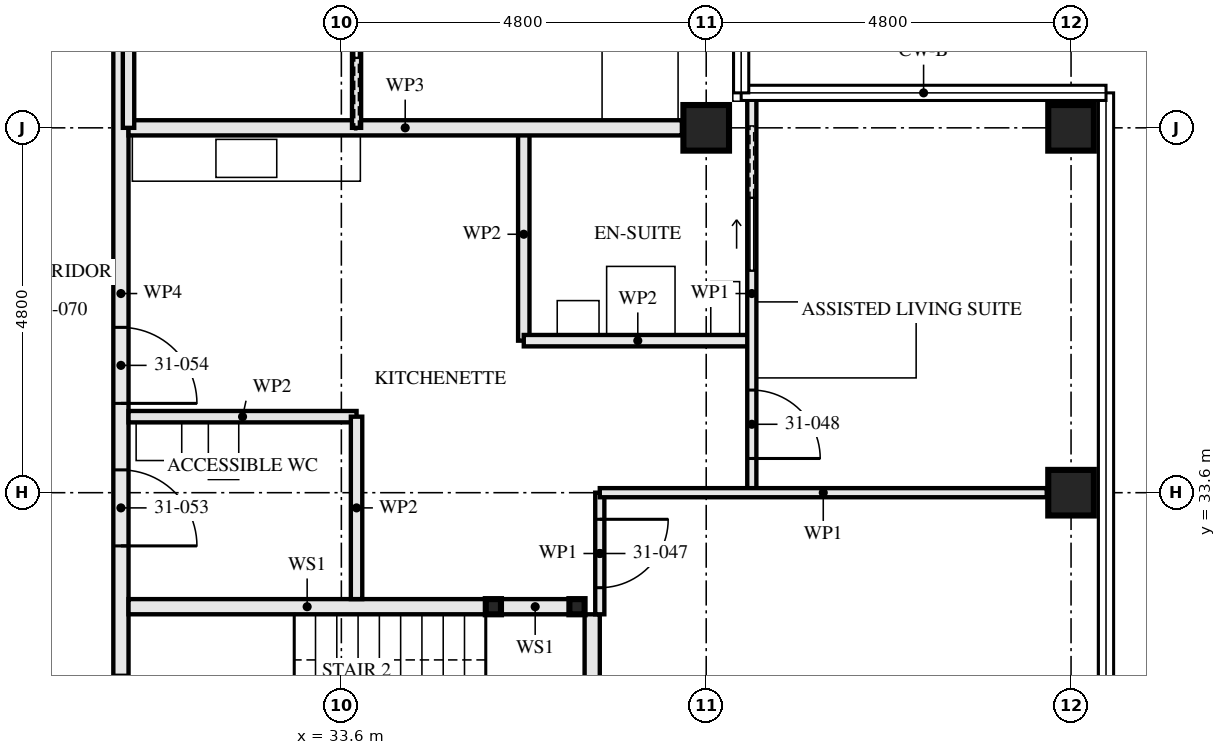
"""IFC4 building model, lengths in metres.
Left out: names, types, materials, properties, quantities, classifications, styles, units other than length and angle.
Written with IfcOpenShell. Run it as: python <this file> out.ifc"""

import sys

from ifc_helpers import new_model, si_unit, direction, frame, frame_2d, origin, origin_2d, place, context, subcontext, project, spatial, rectangle, hollow_rectangle, extrude, element, fill, save


model = new_model("IFC4")
c1 = context("Model", 3, precision=1e-05, world=origin(), true_north=direction((0.0, 1.0)))
c2 = subcontext(c1, "Body", "Model", "MODEL_VIEW")
j1 = project(units=[si_unit("LENGTHUNIT", "METRE"), si_unit("PLANEANGLEUNIT", "RADIAN")], contexts=[c1])
p1 = place(None, origin())
s1 = spatial("IfcSite", under=j1, at=p1, CompositionType="ELEMENT")
p2 = place(p1, origin())
s2 = spatial("IfcBuilding", under=s1, at=p2, CompositionType="ELEMENT")
p3 = place(p2, frame((0.0, 0.0, 115.5)))
s3 = spatial("IfcBuildingStorey", under=s2, at=p3, CompositionType="ELEMENT", Elevation=115.5)
for number, where, z_axis, x_axis in (
    (1, (38.4, 38.4, 0.0), (0.0, 0.0, 1.0), (0.0, 1.0, 0.0)),
    (2, (43.2, 33.6, 0.0), (0.0, 0.0, 1.0), (1.0, 0.0, 0.0)),
    (3, (43.2, 38.4, 0.0), (0.0, 0.0, 1.0), (0.0, 1.0, 0.0)),
):
    element("IfcColumn", number, at=place(p3, frame(where, z_axis=z_axis, x_axis=x_axis)), inside=s3, PredefinedType="COLUMN", context=c2, shape_type="SweptSolid", body=[
        extrude(hollow_rectangle(XDim=0.6, YDim=0.6, WallThickness=0.08, at=origin_2d()), origin(), (0.0, 0.0, 1.0), 3.5),
    ])
for number, where, z_axis, x_axis in (
    (4, (36.7, 32.1, 0.0), (0.0, 0.0, 1.0), (1.0, 0.0, 0.0)),
    (5, (35.6, 32.1, 0.0), (0.0, 0.0, 1.0), (1.0, 0.0, 0.0)),
):
    element("IfcColumn", number, at=place(p3, frame(where, z_axis=z_axis, x_axis=x_axis)), inside=s3, PredefinedType="COLUMN", context=c2, shape_type="SweptSolid", body=[
        extrude(hollow_rectangle(XDim=0.2, YDim=0.2, WallThickness=0.008, at=origin_2d()), origin(), (0.0, 0.0, 1.0), 3.33),
    ])
p4 = place(p3, frame((36.6, 32.1, 0.0), z_axis=(0.0, 0.0, 1.0), x_axis=(-1.0, 0.0, 0.0)))
e6 = element("IfcWall", 6, at=p4, inside=s3, PredefinedType="SOLIDWALL", context=c2, shape_type="SweptSolid", body=[
    extrude(rectangle(XDim=0.9, YDim=0.2, at=frame_2d((0.45, 0.0))), origin(), (0.0, 0.0, 1.0), 2.99),
])
p5 = place(p3, frame((35.5, 32.1, 0.0), z_axis=(0.0, 0.0, 1.0), x_axis=(-1.0, 0.0, 0.0)))
e7 = element("IfcWall", 7, at=p5, inside=s3, PredefinedType="SOLIDWALL", context=c2, shape_type="SweptSolid", body=[
    extrude(rectangle(XDim=4.7, YDim=0.2, at=frame_2d((2.35, 0.0))), origin(), (0.0, 0.0, 1.0), 2.99),
])
p6 = place(p3, frame((36.9, 29.4, 0.0), z_axis=(0.0, 0.0, 1.0), x_axis=(0.0, 1.0, 0.0)))
e8 = element("IfcWall", 8, at=p6, inside=s3, PredefinedType="SOLIDWALL", context=c2, shape_type="SweptSolid", body=[
    extrude(rectangle(XDim=2.6, YDim=0.2, at=frame_2d((1.3, 0.0))), origin(), (0.0, 0.0, 1.0), 3.33),
])
p7 = place(p3, frame((33.8, 32.2, 0.0), z_axis=(0.0, 0.0, 1.0), x_axis=(0.0, 1.0, 0.0)))
e9 = element("IfcWall", 9, at=p7, inside=s3, PredefinedType="PARTITIONING", context=c2, shape_type="SweptSolid", body=[
    extrude(rectangle(XDim=2.4, YDim=0.15, at=frame_2d((1.2, 0.0))), origin(), (0.0, 0.0, 1.0), 2.55),
])
for number, where, z_axis, x_axis in (
    (10, (33.8, 34.6, 0.0), (0.0, 0.0, 1.0), (-1.0, 0.0, 0.0)),
    (11, (39.0, 35.6, 0.0), (0.0, 0.0, 1.0), (-1.0, 0.0, 0.0)),
):
    element("IfcWall", number, at=place(p3, frame(where, z_axis=z_axis, x_axis=x_axis)), inside=s3, PredefinedType="PARTITIONING", context=c2, shape_type="SweptSolid", body=[
        extrude(rectangle(XDim=3.0, YDim=0.15, at=frame_2d((1.5, 0.0))), origin(), (0.0, 0.0, 1.0), 3.33),
    ])
p8 = place(p3, frame((36.0, 35.6, 0.0), z_axis=(0.0, 0.0, 1.0), x_axis=(0.0, 1.0, 0.0)))
e12 = element("IfcWall", 12, at=p8, inside=s3, PredefinedType="PARTITIONING", context=c2, shape_type="SweptSolid", body=[
    extrude(rectangle(XDim=2.8, YDim=0.15, at=frame_2d((1.4, 0.0))), origin(), (0.0, 0.0, 1.0), 3.33),
])
p9 = place(p3, frame((37.0, 32.0, 0.0), z_axis=(0.0, 0.0, 1.0), x_axis=(0.0, 1.0, 0.0)))
e13 = element("IfcWall", 13, at=p9, inside=s3, PredefinedType="PARTITIONING", context=c2, shape_type="SweptSolid", body=[
    extrude(rectangle(XDim=1.6, YDim=0.12, at=frame_2d((0.8, 0.0))), origin(), (0.0, 0.0, 1.0), 3.33),
])
p10 = place(p9, frame((0.35, 0.0, 0.0)))
e14 = element("IfcOpeningElement", 14, at=p10, cuts=e13, PredefinedType="OPENING", context=c2, shape_type="SweptSolid", body=[
    extrude(rectangle(XDim=0.9, YDim=2.1, at=frame_2d((0.45, 1.05))), frame((0.0, 0.071, 0.0), z_axis=(0.0, -1.0, 0.0), x_axis=(1.0, 0.0, 0.0)), (0.0, 0.0, 1.0), 0.141),
])
p11 = place(p3, frame((39.0, 33.6, 0.0), z_axis=(0.0, 0.0, 1.0), x_axis=(0.0, 1.0, 0.0)))
e15 = element("IfcWall", 15, at=p11, inside=s3, PredefinedType="PARTITIONING", context=c2, shape_type="SweptSolid", body=[
    extrude(rectangle(XDim=5.24, YDim=0.12, at=frame_2d((2.62, 0.0))), origin(), (0.0, 0.0, 1.0), 2.32),
])
p12 = place(p11, frame((0.45, 0.0, 0.0)))
e16 = element("IfcOpeningElement", 16, at=p12, cuts=e15, PredefinedType="OPENING", context=c2, shape_type="SweptSolid", body=[
    extrude(rectangle(XDim=0.9, YDim=2.1, at=frame_2d((0.45, 1.05))), frame((0.0, 0.071, 0.0), z_axis=(0.0, -1.0, 0.0), x_axis=(1.0, 0.0, 0.0)), (0.0, 0.0, 1.0), 0.141),
])
p13 = place(p11, frame((2.925, 0.0, 0.0)))
e17 = element("IfcOpeningElement", 17, at=p13, cuts=e15, PredefinedType="OPENING", context=c2, shape_type="SweptSolid", body=[
    extrude(rectangle(XDim=0.95, YDim=2.1, at=frame_2d((0.475, 1.05))), frame((0.0, 0.071, 0.0), z_axis=(0.0, -1.0, 0.0), x_axis=(1.0, 0.0, 0.0)), (0.0, 0.0, 1.0), 0.141),
])
p14 = place(p3, frame((42.88, 33.6, 0.0), z_axis=(0.0, 0.0, 1.0), x_axis=(-1.0, 0.0, 0.0)))
e18 = element("IfcWall", 18, at=p14, inside=s3, PredefinedType="PARTITIONING", context=c2, shape_type="SweptSolid", body=[
    extrude(rectangle(XDim=5.88, YDim=0.12, at=frame_2d((2.94, 0.0))), origin(), (0.0, 0.0, 1.0), 2.55),
])
p15 = place(p3, frame((38.08, 38.4, 0.0), z_axis=(0.0, 0.0, 1.0), x_axis=(-1.0, 0.0, 0.0)))
e19 = element("IfcWall", 19, at=p15, inside=s3, PredefinedType="PARTITIONING", context=c2, shape_type="SweptSolid", body=[
    extrude(rectangle(XDim=7.28, YDim=0.2, at=frame_2d((3.64, 0.0))), origin(), (0.0, 0.0, 1.0), 2.55),
])
p16 = place(p3, frame((30.8, 38.4, 0.0), z_axis=(0.0, 0.0, 1.0), x_axis=(0.0, 1.0, 0.0)))
e20 = element("IfcWall", 20, at=p16, inside=s3, PredefinedType="PARTITIONING", context=c2, shape_type="SweptSolid", body=[
    extrude(rectangle(XDim=2.8, YDim=0.15, at=frame_2d((1.4, 0.0))), origin(), (0.0, 0.0, 1.0), 3.33),
])
p17 = place(p3, frame((33.8, 38.4, 0.0), z_axis=(0.0, 0.0, 1.0), x_axis=(0.0, 1.0, 0.0)))
e21 = element("IfcWall", 21, at=p17, inside=s3, PredefinedType="PARTITIONING", context=c2, shape_type="SweptSolid", body=[
    extrude(rectangle(XDim=4.48, YDim=0.12, at=frame_2d((2.24, 0.0))), origin(), (0.0, 0.0, 1.0), 3.33),
])
p18 = place(p17, frame((2.975, 0.0, 0.0)))
e22 = element("IfcOpeningElement", 22, at=p18, cuts=e21, PredefinedType="OPENING", context=c2, shape_type="SweptSolid", body=[
    extrude(rectangle(XDim=0.9, YDim=2.1, at=frame_2d((0.45, 1.05))), frame((0.0, 0.071, 0.0), z_axis=(0.0, -1.0, 0.0), x_axis=(1.0, 0.0, 0.0)), (0.0, 0.0, 1.0), 0.141),
])
p19 = place(p17, frame((0.925, 0.0, 0.0)))
e23 = element("IfcOpeningElement", 23, at=p19, cuts=e21, PredefinedType="OPENING", context=c2, shape_type="SweptSolid", body=[
    extrude(rectangle(XDim=0.95, YDim=2.1, at=frame_2d((0.475, 1.05))), frame((0.0, 0.071, 0.0), z_axis=(0.0, -1.0, 0.0), x_axis=(1.0, 0.0, 0.0)), (0.0, 0.0, 1.0), 0.141),
])
p20 = place(p3, frame((30.7, 28.8, 0.0), z_axis=(0.0, 0.0, 1.0), x_axis=(0.0, 1.0, 0.0)))
e24 = element("IfcWall", 24, at=p20, inside=s3, PredefinedType="PARTITIONING", context=c2, shape_type="SweptSolid", body=[
    extrude(rectangle(XDim=14.84, YDim=0.2, at=frame_2d((7.42, 0.0))), origin(), (0.0, 0.0, 1.0), 2.32),
])
p21 = place(p20, frame((1.4, 0.0, 0.0)))
e25 = element("IfcOpeningElement", 25, at=p21, cuts=e24, PredefinedType="OPENING", context=c2, shape_type="SweptSolid", body=[
    extrude(rectangle(XDim=1.0, YDim=2.1, at=frame_2d((0.5, 1.05))), frame((0.0, 0.111, 0.0), z_axis=(0.0, -1.0, 0.0), x_axis=(1.0, 0.0, 0.0)), (0.0, 0.0, 1.0), 0.221),
])
p22 = place(p20, frame((4.1, 0.0, 0.0)))
e26 = element("IfcOpeningElement", 26, at=p22, cuts=e24, PredefinedType="OPENING", context=c2, shape_type="SweptSolid", body=[
    extrude(rectangle(XDim=1.0, YDim=2.1, at=frame_2d((0.5, 1.05))), frame((0.0, 0.111, 0.0), z_axis=(0.0, -1.0, 0.0), x_axis=(1.0, 0.0, 0.0)), (0.0, 0.0, 1.0), 0.221),
])
p23 = place(p20, frame((5.975, 0.0, 0.0)))
e27 = element("IfcOpeningElement", 27, at=p23, cuts=e24, PredefinedType="OPENING", context=c2, shape_type="SweptSolid", body=[
    extrude(rectangle(XDim=1.0, YDim=2.1, at=frame_2d((0.5, 1.05))), frame((0.0, 0.111, 0.0), z_axis=(0.0, -1.0, 0.0), x_axis=(1.0, 0.0, 0.0)), (0.0, 0.0, 1.0), 0.221),
])
p24 = place(p20, frame((13.0, 0.0, 0.0)))
e28 = element("IfcOpeningElement", 28, at=p24, cuts=e24, PredefinedType="OPENING", context=c2, shape_type="SweptSolid", body=[
    extrude(rectangle(XDim=1.0, YDim=2.1, at=frame_2d((0.5, 1.05))), frame((0.0, 0.111, 0.0), z_axis=(0.0, -1.0, 0.0), x_axis=(1.0, 0.0, 0.0)), (0.0, 0.0, 1.0), 0.221),
])
p25 = place(p10, frame((0.9, 0.0, 0.0), z_axis=(0.0, 0.0, 1.0), x_axis=(-1.0, 0.0, 0.0)))
e29 = element("IfcDoor", 29, at=p25, inside=s3, OperationType="SINGLE_SWING_RIGHT", PredefinedType="DOOR", context=c2, shape_type="SweptSolid", body=[
    extrude(rectangle(XDim=0.9, YDim=2.1, at=frame_2d((0.45, 1.05))), frame((0.0, 0.022, 0.0), z_axis=(0.0, -1.0, 0.0), x_axis=(1.0, 0.0, 0.0)), (0.0, 0.0, 1.0), 0.044),
])
fill(e14, e29)
p26 = place(p12, frame((0.9, 0.0, 0.0), z_axis=(0.0, 0.0, 1.0), x_axis=(-1.0, 0.0, 0.0)))
e30 = element("IfcDoor", 30, at=p26, inside=s3, OperationType="SINGLE_SWING_LEFT", PredefinedType="DOOR", context=c2, shape_type="SweptSolid", body=[
    extrude(rectangle(XDim=0.9, YDim=2.1, at=frame_2d((0.45, 1.05))), frame((0.0, 0.022, 0.0), z_axis=(0.0, -1.0, 0.0), x_axis=(1.0, 0.0, 0.0)), (0.0, 0.0, 1.0), 0.044),
])
fill(e16, e30)
p27 = place(p13, origin())
e31 = element("IfcDoor", 31, at=p27, inside=s3, OperationType="SLIDING_TO_LEFT", PredefinedType="DOOR", context=c2, shape_type="SweptSolid", body=[
    extrude(rectangle(XDim=0.95, YDim=2.1, at=frame_2d((0.475, 1.05))), frame((0.0, 0.022, 0.0), z_axis=(0.0, -1.0, 0.0), x_axis=(1.0, 0.0, 0.0)), (0.0, 0.0, 1.0), 0.044),
])
fill(e17, e31)
p28 = place(p19, origin())
e32 = element("IfcDoor", 32, at=p28, inside=s3, OperationType="SLIDING_TO_RIGHT", PredefinedType="DOOR", context=c2, shape_type="SweptSolid", body=[
    extrude(rectangle(XDim=0.95, YDim=2.1, at=frame_2d((0.475, 1.05))), frame((0.0, 0.022, 0.0), z_axis=(0.0, -1.0, 0.0), x_axis=(1.0, 0.0, 0.0)), (0.0, 0.0, 1.0), 0.044),
])
fill(e23, e32)
p29 = place(p22, frame((1.0, 0.0, 0.0), z_axis=(0.0, 0.0, 1.0), x_axis=(-1.0, 0.0, 0.0)))
e33 = element("IfcDoor", 33, at=p29, inside=s3, OperationType="SINGLE_SWING_LEFT", PredefinedType="DOOR", context=c2, shape_type="SweptSolid", body=[
    extrude(rectangle(XDim=1.0, YDim=2.1, at=frame_2d((0.5, 1.05))), frame((0.0, 0.027, 0.0), z_axis=(0.0, -1.0, 0.0), x_axis=(1.0, 0.0, 0.0)), (0.0, 0.0, 1.0), 0.054),
])
fill(e26, e33)
p30 = place(p23, frame((1.0, 0.0, 0.0), z_axis=(0.0, 0.0, 1.0), x_axis=(-1.0, 0.0, 0.0)))
e34 = element("IfcDoor", 34, at=p30, inside=s3, OperationType="SINGLE_SWING_LEFT", PredefinedType="DOOR", context=c2, shape_type="SweptSolid", body=[
    extrude(rectangle(XDim=1.0, YDim=2.1, at=frame_2d((0.5, 1.05))), frame((0.0, 0.027, 0.0), z_axis=(0.0, -1.0, 0.0), x_axis=(1.0, 0.0, 0.0)), (0.0, 0.0, 1.0), 0.054),
])
fill(e27, e34)
save(model, sys.argv[1])
